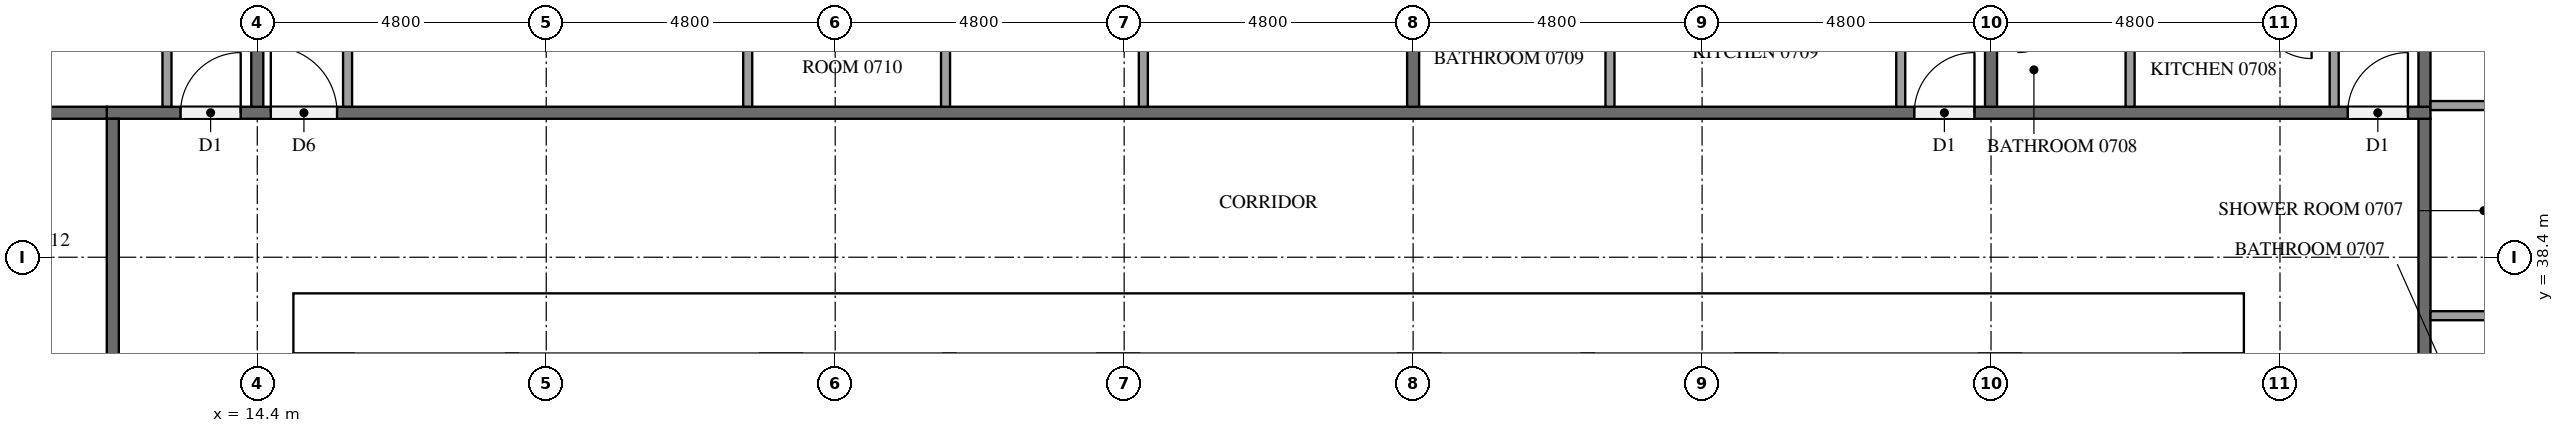
"""IFC4 building model, lengths in metres.
Left out: names, types, materials, properties, quantities, classifications, styles, units other than length and angle.
Written with IfcOpenShell. Run it as: python <this file> out.ifc"""

import sys

from ifc_helpers import new_model, si_unit, direction, frame, frame_2d, origin, place, context, subcontext, project, spatial, rectangle, extrude, element, fill, save


model = new_model("IFC4")
c1 = context("Model", 3, precision=1e-05, world=origin(), true_north=direction((0.0, 1.0)))
c2 = subcontext(c1, "Body", "Model", "MODEL_VIEW")
j1 = project(units=[si_unit("LENGTHUNIT", "METRE"), si_unit("PLANEANGLEUNIT", "RADIAN")], contexts=[c1])
p1 = place(None, origin())
s1 = spatial("IfcSite", under=j1, at=p1, CompositionType="ELEMENT")
p2 = place(p1, origin())
s2 = spatial("IfcBuilding", under=s1, at=p2, CompositionType="ELEMENT")
p3 = place(p2, frame((0.0, 0.0, 32.9)))
s3 = spatial("IfcBuildingStorey", under=s2, at=p3, CompositionType="ELEMENT", Elevation=32.9)
p4 = place(p3, frame((15.0, 37.3, 0.0), z_axis=(0.0, 0.0, 1.0), x_axis=(1.0, 0.0, 0.0)))
e1 = element("IfcWall", 1, at=p4, inside=s3, PredefinedType="SHEAR", context=c2, shape_type="SweptSolid", body=[
    extrude(rectangle(XDim=32.4, YDim=1.0, at=frame_2d((16.2, 0.0))), origin(), (0.0, 0.0, 1.0), 3.2),
])
p5 = place(p4, frame((15.3, 0.0, 0.0)))
e2 = element("IfcOpeningElement", 2, at=p5, cuts=e1, PredefinedType="OPENING", context=c2, shape_type="SweptSolid", body=[
    extrude(rectangle(XDim=1.8, YDim=2.1, at=frame_2d((0.9, 1.05))), frame((0.0, 0.51, 0.0), z_axis=(0.0, -1.0, 0.0), x_axis=(1.0, 0.0, 0.0)), (0.0, 0.0, 1.0), 1.02),
])
p6 = place(p4, frame((1.766, 0.0, 0.0)))
e3 = element("IfcOpeningElement", 3, at=p6, cuts=e1, PredefinedType="OPENING", context=c2, shape_type="SweptSolid", body=[
    extrude(rectangle(XDim=1.0, YDim=2.1, at=frame_2d((0.5, 1.05))), frame((0.0, 0.51, 0.0), z_axis=(0.0, -1.0, 0.0), x_axis=(1.0, 0.0, 0.0)), (0.0, 0.0, 1.0), 1.02),
])
p7 = place(p4, frame((5.241, 0.0, 0.0)))
e4 = element("IfcOpeningElement", 4, at=p7, cuts=e1, PredefinedType="OPENING", context=c2, shape_type="SweptSolid", body=[
    extrude(rectangle(XDim=1.0, YDim=2.1, at=frame_2d((0.5, 1.05))), frame((0.0, 0.51, 0.0), z_axis=(0.0, -1.0, 0.0), x_axis=(1.0, 0.0, 0.0)), (0.0, 0.0, 1.0), 1.02),
])
for number, where, z_axis, x_axis in (
    (5, (28.7, 33.9, 0.0), (0.0, 0.0, 1.0), (0.0, 1.0, 0.0)),
    (6, (33.7, 33.9, 0.0), (0.0, 0.0, 1.0), (0.0, 1.0, 0.0)),
):
    element("IfcWall", number, at=place(p3, frame(where, z_axis=z_axis, x_axis=x_axis)), inside=s3, PredefinedType="SHEAR", context=c2, shape_type="SweptSolid", body=[
        extrude(rectangle(XDim=2.9, YDim=0.7, at=frame_2d((1.45, 0.0))), origin(), (0.0, 0.0, 1.0), 3.2),
    ])
for number, where, z_axis, x_axis in (
    (7, (25.9, 33.9, 0.0), (0.0, 0.0, 1.0), (0.0, 1.0, 0.0)),
    (8, (36.5, 33.9, 0.0), (0.0, 0.0, 1.0), (0.0, 1.0, 0.0)),
):
    element("IfcWall", number, at=place(p3, frame(where, z_axis=z_axis, x_axis=x_axis)), inside=s3, PredefinedType="SOLIDWALL", context=c2, shape_type="SweptSolid", body=[
        extrude(rectangle(XDim=2.9, YDim=0.2, at=frame_2d((1.45, 0.0))), origin(), (0.0, 0.0, 1.0), 3.2),
    ])
p8 = place(p3, frame((18.633, 31.6, 0.0), z_axis=(0.0, 0.0, 1.0), x_axis=(0.0, 1.0, 0.0)))
e9 = element("IfcWall", 9, at=p8, inside=s3, PredefinedType="PARTITIONING", context=c2, shape_type="SweptSolid", body=[
    extrude(rectangle(XDim=5.2, YDim=0.2, at=frame_2d((2.6, 0.0))), origin(), (0.0, 0.0, 1.0), 3.2),
])
p9 = place(p3, frame((50.4, 40.7, 0.0), z_axis=(0.0, 0.0, 1.0), x_axis=(0.0, -1.0, 0.0)))
e10 = element("IfcWall", 10, at=p9, inside=s3, PredefinedType="PARTITIONING", context=c2, shape_type="SweptSolid", body=[
    extrude(rectangle(XDim=28.6, YDim=0.2, at=frame_2d((14.3, 0.0))), origin(), (0.0, 0.0, 1.0), 3.2),
])
p10 = place(p9, frame((27.375, 0.0, 0.0)))
e11 = element("IfcOpeningElement", 11, at=p10, cuts=e10, PredefinedType="OPENING", context=c2, shape_type="SweptSolid", body=[
    extrude(rectangle(XDim=1.1, YDim=2.1, at=frame_2d((0.55, 1.05))), frame((0.0, 0.11, 0.0), z_axis=(0.0, -1.0, 0.0), x_axis=(1.0, 0.0, 0.0)), (0.0, 0.0, 1.0), 0.22),
])
p11 = place(p9, frame((8.225, 0.0, 0.0)))
e12 = element("IfcOpeningElement", 12, at=p11, cuts=e10, PredefinedType="OPENING", context=c2, shape_type="SweptSolid", body=[
    extrude(rectangle(XDim=1.0, YDim=2.1, at=frame_2d((0.5, 1.05))), frame((0.0, 0.11, 0.0), z_axis=(0.0, -1.0, 0.0), x_axis=(1.0, 0.0, 0.0)), (0.0, 0.0, 1.0), 0.22),
])
p12 = place(p3, frame((11.9, 40.8, 0.0), z_axis=(0.0, 0.0, 1.0), x_axis=(1.0, 0.0, 0.0)))
e13 = element("IfcWall", 13, at=p12, inside=s3, PredefinedType="PARTITIONING", context=c2, shape_type="SweptSolid", body=[
    extrude(rectangle(XDim=38.6, YDim=0.2, at=frame_2d((19.3, 0.0))), origin(), (0.0, 0.0, 1.0), 3.2),
])
p13 = place(p12, frame((37.225, 0.0, 0.0)))
e14 = element("IfcOpeningElement", 14, at=p13, cuts=e13, PredefinedType="OPENING", context=c2, shape_type="SweptSolid", body=[
    extrude(rectangle(XDim=1.0, YDim=2.1, at=frame_2d((0.5, 1.05))), frame((0.0, 0.11, 0.0), z_axis=(0.0, -1.0, 0.0), x_axis=(1.0, 0.0, 0.0)), (0.0, 0.0, 1.0), 0.22),
])
p14 = place(p12, frame((30.025, 0.0, 0.0)))
e15 = element("IfcOpeningElement", 15, at=p14, cuts=e13, PredefinedType="OPENING", context=c2, shape_type="SweptSolid", body=[
    extrude(rectangle(XDim=1.0, YDim=2.1, at=frame_2d((0.5, 1.05))), frame((0.0, 0.11, 0.0), z_axis=(0.0, -1.0, 0.0), x_axis=(1.0, 0.0, 0.0)), (0.0, 0.0, 1.0), 0.22),
])
p15 = place(p12, frame((2.725, 0.0, 0.0)))
e16 = element("IfcOpeningElement", 16, at=p15, cuts=e13, PredefinedType="OPENING", context=c2, shape_type="SweptSolid", body=[
    extrude(rectangle(XDim=1.1, YDim=2.1, at=frame_2d((0.55, 1.05))), frame((0.0, 0.11, 0.0), z_axis=(0.0, -1.0, 0.0), x_axis=(1.0, 0.0, 0.0)), (0.0, 0.0, 1.0), 0.22),
])
p16 = place(p12, frame((1.225, 0.0, 0.0)))
e17 = element("IfcOpeningElement", 17, at=p16, cuts=e13, PredefinedType="OPENING", context=c2, shape_type="SweptSolid", body=[
    extrude(rectangle(XDim=1.0, YDim=2.1, at=frame_2d((0.5, 1.05))), frame((0.0, 0.11, 0.0), z_axis=(0.0, -1.0, 0.0), x_axis=(1.0, 0.0, 0.0)), (0.0, 0.0, 1.0), 0.22),
])
p17 = place(p3, frame((12.0, 12.1, 0.0), z_axis=(0.0, 0.0, 1.0), x_axis=(0.0, 1.0, 0.0)))
e18 = element("IfcWall", 18, at=p17, inside=s3, PredefinedType="PARTITIONING", context=c2, shape_type="SweptSolid", body=[
    extrude(rectangle(XDim=28.6, YDim=0.2, at=frame_2d((14.3, 0.0))), origin(), (0.0, 0.0, 1.0), 3.2),
])
p18 = place(p17, frame((16.975, 0.0, 0.0)))
e19 = element("IfcOpeningElement", 19, at=p18, cuts=e18, PredefinedType="OPENING", context=c2, shape_type="SweptSolid", body=[
    extrude(rectangle(XDim=1.0, YDim=2.1, at=frame_2d((0.5, 1.05))), frame((0.0, 0.11, 0.0), z_axis=(0.0, -1.0, 0.0), x_axis=(1.0, 0.0, 0.0)), (0.0, 0.0, 1.0), 0.22),
])
p19 = place(p17, frame((0.175, 0.0, 0.0)))
e20 = element("IfcOpeningElement", 20, at=p19, cuts=e18, PredefinedType="OPENING", context=c2, shape_type="SweptSolid", body=[
    extrude(rectangle(XDim=1.0, YDim=2.1, at=frame_2d((0.5, 1.05))), frame((0.0, 0.11, 0.0), z_axis=(0.0, -1.0, 0.0), x_axis=(1.0, 0.0, 0.0)), (0.0, 0.0, 1.0), 0.22),
])
p20 = place(p3, frame((50.4, 40.9, 0.0), z_axis=(0.0, 0.0, 1.0), x_axis=(0.0, 1.0, 0.0)))
e21 = element("IfcWall", 21, at=p20, inside=s3, PredefinedType="PARTITIONING", context=c2, shape_type="SweptSolid", body=[
    extrude(rectangle(XDim=7.0, YDim=0.2, at=frame_2d((3.5, 0.0))), origin(), (0.0, 0.0, 1.0), 3.2),
])
for number, where, z_axis, x_axis in (
    (22, (43.2, 47.55, 0.0), (0.0, 0.0, 1.0), (0.0, -1.0, 0.0)),
    (23, (33.6, 47.55, 0.0), (0.0, 0.0, 1.0), (0.0, -1.0, 0.0)),
    (24, (14.4, 47.55, 0.0), (0.0, 0.0, 1.0), (0.0, -1.0, 0.0)),
):
    element("IfcWall", number, at=place(p3, frame(where, z_axis=z_axis, x_axis=x_axis)), inside=s3, PredefinedType="PARTITIONING", context=c2, shape_type="SweptSolid", body=[
        extrude(rectangle(XDim=6.65, YDim=0.2, at=frame_2d((3.325, 0.0))), origin(), (0.0, 0.0, 1.0), 3.2),
    ])
p21 = place(p3, frame((0.1, 40.8, 0.0), z_axis=(0.0, 0.0, 1.0), x_axis=(1.0, 0.0, 0.0)))
e25 = element("IfcWall", 25, at=p21, inside=s3, PredefinedType="PARTITIONING", context=c2, shape_type="SweptSolid", body=[
    extrude(rectangle(XDim=11.8, YDim=0.2, at=frame_2d((5.9, 0.0))), origin(), (0.0, 0.0, 1.0), 3.2),
])
for number, where, z_axis, x_axis in (
    (26, (50.5, 37.429, 0.0), (0.0, 0.0, 1.0), (1.0, 0.0, 0.0)),
    (27, (50.5, 40.919, 0.0), (0.0, 0.0, 1.0), (1.0, 0.0, 0.0)),
):
    element("IfcWall", number, at=place(p3, frame(where, z_axis=z_axis, x_axis=x_axis)), inside=s3, PredefinedType="PARTITIONING", context=c2, shape_type="SweptSolid", body=[
        extrude(rectangle(XDim=1.775, YDim=0.15, at=frame_2d((0.887, 0.0))), origin(), (0.0, 0.0, 1.0), 3.2),
    ])
p22 = place(p3, frame((45.51, 40.9, 0.0), z_axis=(0.0, 0.0, 1.0), x_axis=(0.0, 1.0, 0.0)))
e28 = element("IfcWall", 28, at=p22, inside=s3, PredefinedType="PARTITIONING", context=c2, shape_type="SweptSolid", body=[
    extrude(rectangle(XDim=1.625, YDim=0.15, at=frame_2d((0.812, 0.0))), origin(), (0.0, 0.0, 1.0), 3.2),
])
for number, where, z_axis, x_axis in (
    (29, (48.9, 40.9, 0.0), (0.0, 0.0, 1.0), (0.0, 1.0, 0.0)),
    (30, (36.87, 40.9, 0.0), (0.0, 0.0, 1.0), (0.0, 1.0, 0.0)),
):
    element("IfcWall", number, at=place(p3, frame(where, z_axis=z_axis, x_axis=x_axis)), inside=s3, PredefinedType="PARTITIONING", context=c2, shape_type="SweptSolid", body=[
        extrude(rectangle(XDim=1.775, YDim=0.15, at=frame_2d((0.888, 0.0))), origin(), (0.0, 0.0, 1.0), 3.2),
    ])
p23 = place(p3, frame((41.7, 40.9, 0.0), z_axis=(0.0, 0.0, 1.0), x_axis=(0.0, 1.0, 0.0)))
e31 = element("IfcWall", 31, at=p23, inside=s3, PredefinedType="PARTITIONING", context=c2, shape_type="SweptSolid", body=[
    extrude(rectangle(XDim=1.925, YDim=0.15, at=frame_2d((0.962, 0.0))), origin(), (0.0, 0.0, 1.0), 3.2),
])
for number, where, z_axis, x_axis in (
    (32, (22.547, 40.9, 0.0), (0.0, 0.0, 1.0), (0.0, 1.0, 0.0)),
    (33, (25.833, 40.9, 0.0), (0.0, 0.0, 1.0), (0.0, 1.0, 0.0)),
    (34, (29.119, 40.9, 0.0), (0.0, 0.0, 1.0), (0.0, 1.0, 0.0)),
):
    element("IfcWall", number, at=place(p3, frame(where, z_axis=z_axis, x_axis=x_axis)), inside=s3, PredefinedType="PARTITIONING", context=c2, shape_type="SweptSolid", body=[
        extrude(rectangle(XDim=2.075, YDim=0.15, at=frame_2d((1.038, 0.0))), origin(), (0.0, 0.0, 1.0), 3.2),
    ])
p24 = place(p3, frame((15.9, 40.9, 0.0), z_axis=(0.0, 0.0, 1.0), x_axis=(0.0, 1.0, 0.0)))
e35 = element("IfcWall", 35, at=p24, inside=s3, PredefinedType="PARTITIONING", context=c2, shape_type="SweptSolid", body=[
    extrude(rectangle(XDim=2.225, YDim=0.15, at=frame_2d((1.113, 0.0))), origin(), (0.0, 0.0, 1.0), 3.2),
])
p25 = place(p3, frame((12.9, 40.9, 0.0), z_axis=(0.0, 0.0, 1.0), x_axis=(0.0, 1.0, 0.0)))
e36 = element("IfcWall", 36, at=p25, inside=s3, PredefinedType="PARTITIONING", context=c2, shape_type="SweptSolid", body=[
    extrude(rectangle(XDim=2.075, YDim=0.15, at=frame_2d((1.038, 0.0))), origin(), (0.0, 0.0, 1.0), 3.2),
])
p26 = place(p5, origin())
e37 = element("IfcDoor", 37, at=p26, inside=s3, OperationType="DOUBLE_DOOR_SINGLE_SWING", PredefinedType="DOOR", context=c2, shape_type="SweptSolid", body=[
    extrude(rectangle(XDim=1.8, YDim=2.1, at=frame_2d((0.9, 1.05))), frame((0.0, 0.025, 0.0), z_axis=(0.0, -1.0, 0.0), x_axis=(1.0, 0.0, 0.0)), (0.0, 0.0, 1.0), 0.05),
])
fill(e2, e37)
p27 = place(p6, origin())
e38 = element("IfcDoor", 38, at=p27, inside=s3, OperationType="SINGLE_SWING_RIGHT", PredefinedType="DOOR", context=c2, shape_type="SweptSolid", body=[
    extrude(rectangle(XDim=1.0, YDim=2.1, at=frame_2d((0.5, 1.05))), frame((0.0, 0.025, 0.0), z_axis=(0.0, -1.0, 0.0), x_axis=(1.0, 0.0, 0.0)), (0.0, 0.0, 1.0), 0.05),
])
fill(e3, e38)
p28 = place(p7, origin())
e39 = element("IfcDoor", 39, at=p28, inside=s3, OperationType="SINGLE_SWING_LEFT", PredefinedType="DOOR", context=c2, shape_type="SweptSolid", body=[
    extrude(rectangle(XDim=1.0, YDim=2.1, at=frame_2d((0.5, 1.05))), frame((0.0, 0.025, 0.0), z_axis=(0.0, -1.0, 0.0), x_axis=(1.0, 0.0, 0.0)), (0.0, 0.0, 1.0), 0.05),
])
fill(e4, e39)
p29 = place(p13, origin())
e40 = element("IfcDoor", 40, at=p29, inside=s3, OperationType="SINGLE_SWING_RIGHT", PredefinedType="DOOR", context=c2, shape_type="SweptSolid", body=[
    extrude(rectangle(XDim=1.0, YDim=2.1, at=frame_2d((0.5, 1.05))), frame((0.0, 0.025, 0.0), z_axis=(0.0, -1.0, 0.0), x_axis=(1.0, 0.0, 0.0)), (0.0, 0.0, 1.0), 0.05),
])
fill(e14, e40)
p30 = place(p14, origin())
e41 = element("IfcDoor", 41, at=p30, inside=s3, OperationType="SINGLE_SWING_RIGHT", PredefinedType="DOOR", context=c2, shape_type="SweptSolid", body=[
    extrude(rectangle(XDim=1.0, YDim=2.1, at=frame_2d((0.5, 1.05))), frame((0.0, 0.025, 0.0), z_axis=(0.0, -1.0, 0.0), x_axis=(1.0, 0.0, 0.0)), (0.0, 0.0, 1.0), 0.05),
])
fill(e15, e41)
p31 = place(p15, origin())
e42 = element("IfcDoor", 42, at=p31, inside=s3, OperationType="SINGLE_SWING_LEFT", PredefinedType="DOOR", context=c2, shape_type="SweptSolid", body=[
    extrude(rectangle(XDim=1.1, YDim=2.1, at=frame_2d((0.55, 1.05))), frame((0.0, 0.025, 0.0), z_axis=(0.0, -1.0, 0.0), x_axis=(1.0, 0.0, 0.0)), (0.0, 0.0, 1.0), 0.05),
])
fill(e16, e42)
p32 = place(p16, origin())
e43 = element("IfcDoor", 43, at=p32, inside=s3, OperationType="SINGLE_SWING_RIGHT", PredefinedType="DOOR", context=c2, shape_type="SweptSolid", body=[
    extrude(rectangle(XDim=1.0, YDim=2.1, at=frame_2d((0.5, 1.05))), frame((0.0, 0.025, 0.0), z_axis=(0.0, -1.0, 0.0), x_axis=(1.0, 0.0, 0.0)), (0.0, 0.0, 1.0), 0.05),
])
fill(e17, e43)
save(model, sys.argv[1])
